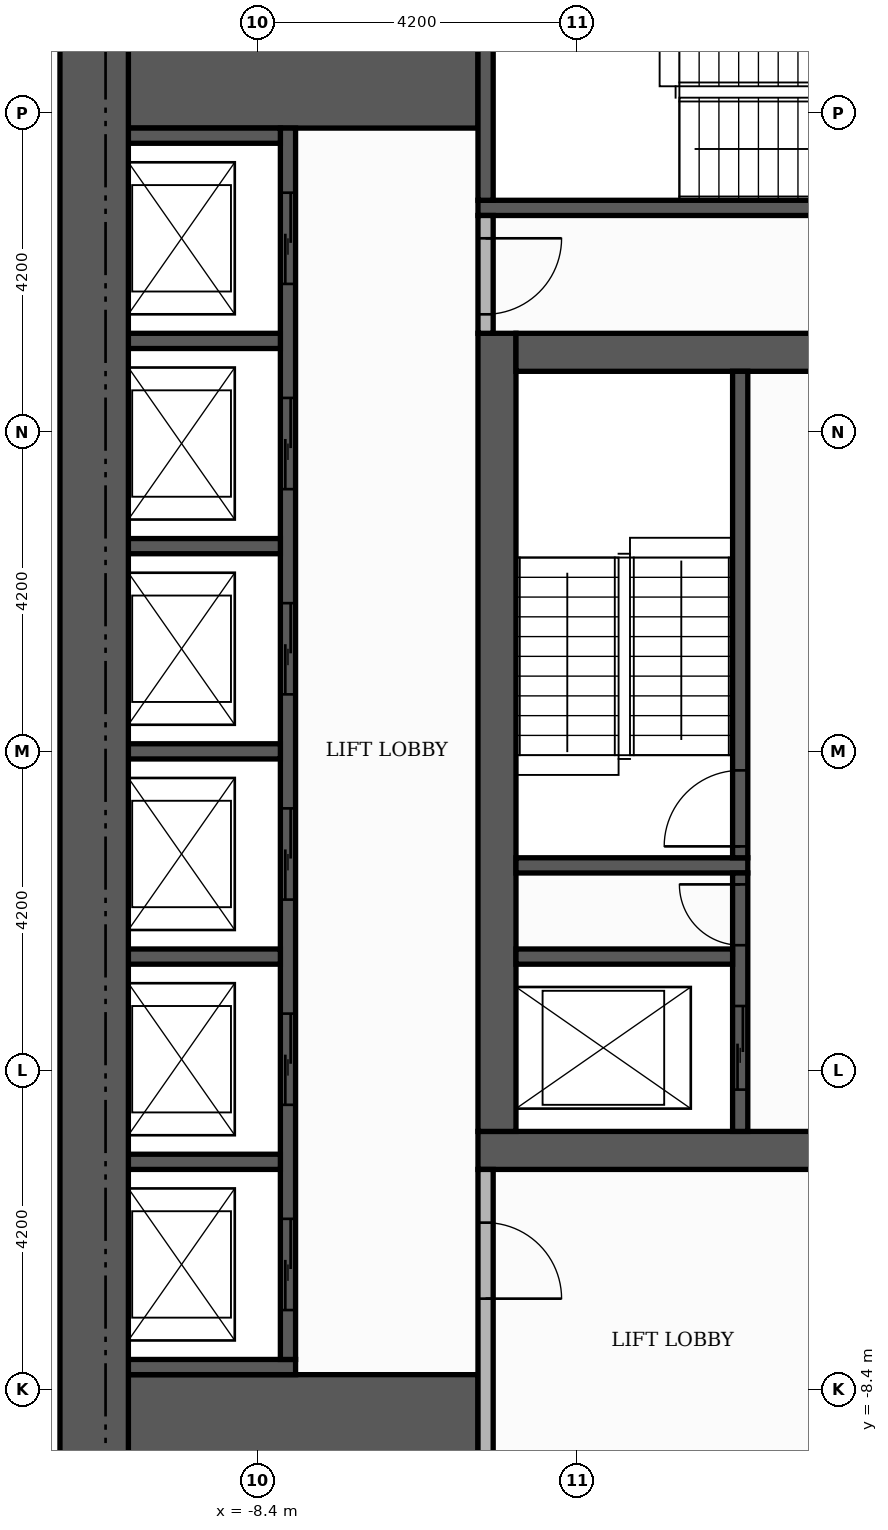
"""IFC4 building model, lengths in metres.
Left out: names, types, materials, properties, quantities, classifications, styles, units other than length and angle.
Written with IfcOpenShell. Run it as: python <this file> out.ifc"""

import sys

from ifc_helpers import new_model, si_unit, direction, frame, frame_2d, origin, place, context, subcontext, project, spatial, rectangle, extrude, element, fill, save


model = new_model("IFC4")
c1 = context("Model", 3, precision=1e-05, world=origin(), true_north=direction((0.0, 1.0)))
c2 = subcontext(c1, "Body", "Model", "MODEL_VIEW")
j1 = project(units=[si_unit("LENGTHUNIT", "METRE"), si_unit("PLANEANGLEUNIT", "RADIAN")], contexts=[c1])
p1 = place(None, origin())
s1 = spatial("IfcSite", under=j1, at=p1, CompositionType="ELEMENT")
p2 = place(p1, origin())
s2 = spatial("IfcBuilding", under=s1, at=p2, CompositionType="ELEMENT")
p3 = place(p2, frame((0.0, 0.0, 50.4)))
s3 = spatial("IfcBuildingStorey", under=s2, at=p3, CompositionType="ELEMENT", Elevation=50.4)
p4 = place(p3, frame((-5.5, -5.25, 0.0), z_axis=(0.0, 0.0, 1.0), x_axis=(1.0, 0.0, 0.0)))
e1 = element("IfcWall", 1, at=p4, inside=s3, PredefinedType="SHEAR", context=c2, shape_type="SweptSolid", body=[
    extrude(rectangle(XDim=11.0, YDim=0.5, at=frame_2d((5.5, 0.0))), origin(), (0.0, 0.0, 1.0), 3.48),
])
p5 = place(p4, frame((4.9, 0.0, 0.0)))
e2 = element("IfcOpeningElement", 2, at=p5, cuts=e1, PredefinedType="OPENING", context=c2, shape_type="SweptSolid", body=[
    extrude(rectangle(XDim=1.2, YDim=2.1, at=frame_2d((0.6, 1.05))), frame((0.0, 0.26, 0.0), z_axis=(0.0, -1.0, 0.0), x_axis=(1.0, 0.0, 0.0)), (0.0, 0.0, 1.0), 0.52),
])
p6 = place(p3, frame((-5.25, -5.0, 0.0), z_axis=(0.0, 0.0, 1.0), x_axis=(0.0, 1.0, 0.0)))
e3 = element("IfcWall", 3, at=p6, inside=s3, PredefinedType="SHEAR", context=c2, shape_type="SweptSolid", body=[
    extrude(rectangle(XDim=10.5, YDim=0.5, at=frame_2d((5.25, 0.0))), origin(), (0.0, 0.0, 1.0), 3.48),
])
p7 = place(p3, frame((-5.0, 5.25, 0.0), z_axis=(0.0, 0.0, 1.0), x_axis=(1.0, 0.0, 0.0)))
e4 = element("IfcWall", 4, at=p7, inside=s3, PredefinedType="SHEAR", context=c2, shape_type="SweptSolid", body=[
    extrude(rectangle(XDim=10.0, YDim=0.5, at=frame_2d((5.0, 0.0))), origin(), (0.0, 0.0, 1.0), 3.48),
])
p8 = place(p7, frame((4.4, 0.0, 0.0)))
e5 = element("IfcOpeningElement", 5, at=p8, cuts=e4, PredefinedType="OPENING", context=c2, shape_type="SweptSolid", body=[
    extrude(rectangle(XDim=1.2, YDim=2.1, at=frame_2d((0.6, 1.05))), frame((0.0, 0.26, 0.0), z_axis=(0.0, -1.0, 0.0), x_axis=(1.0, 0.0, 0.0)), (0.0, 0.0, 1.0), 0.52),
])
for number, where, z_axis, x_axis in (
    (6, (-10.1, -9.15, 0.0), (0.0, 0.0, 1.0), (1.0, 0.0, 0.0)),
    (7, (-10.1, 9.15, 0.0), (0.0, 0.0, 1.0), (1.0, 0.0, 0.0)),
):
    element("IfcWall", number, at=place(p3, frame(where, z_axis=z_axis, x_axis=x_axis)), inside=s3, PredefinedType="SHEAR", context=c2, shape_type="SweptSolid", body=[
        extrude(rectangle(XDim=4.6, YDim=1.9, at=frame_2d((2.3, 0.0))), origin(), (0.0, 0.0, 1.0), 3.48),
    ])
p9 = place(p3, frame((-5.0, -1.5, 0.0), z_axis=(0.0, 0.0, 1.0), x_axis=(1.0, 0.0, 0.0)))
e8 = element("IfcWall", 8, at=p9, inside=s3, PredefinedType="SHEAR", context=c2, shape_type="SweptSolid", body=[
    extrude(rectangle(XDim=3.05, YDim=0.2, at=frame_2d((1.525, 0.0))), origin(), (0.0, 0.0, 1.0), 3.48),
])
p10 = place(p3, frame((-2.05, -1.4, 0.0), z_axis=(0.0, 0.0, 1.0), x_axis=(0.0, 1.0, 0.0)))
e9 = element("IfcWall", 9, at=p10, inside=s3, PredefinedType="SHEAR", context=c2, shape_type="SweptSolid", body=[
    extrude(rectangle(XDim=6.4, YDim=0.2, at=frame_2d((3.2, 0.0))), origin(), (0.0, 0.0, 1.0), 3.48),
])
p11 = place(p10, frame((0.15, 0.0, 0.0)))
e10 = element("IfcOpeningElement", 10, at=p11, cuts=e9, PredefinedType="OPENING", context=c2, shape_type="SweptSolid", body=[
    extrude(rectangle(XDim=1.0, YDim=2.1, at=frame_2d((0.5, 1.05))), frame((0.0, 0.11, 0.0), z_axis=(0.0, -1.0, 0.0), x_axis=(1.0, 0.0, 0.0)), (0.0, 0.0, 1.0), 0.22),
])
p12 = place(p3, frame((-5.5, 7.15, 0.0), z_axis=(0.0, 0.0, 1.0), x_axis=(1.0, 0.0, 0.0)))
e11 = element("IfcWall", 11, at=p12, inside=s3, PredefinedType="SHEAR", context=c2, shape_type="SweptSolid", body=[
    extrude(rectangle(XDim=6.8, YDim=0.2, at=frame_2d((3.4, 0.0))), origin(), (0.0, 0.0, 1.0), 3.48),
])
p13 = place(p3, frame((-5.4, 7.25, 0.0), z_axis=(0.0, 0.0, 1.0), x_axis=(0.0, 1.0, 0.0)))
e12 = element("IfcWall", 12, at=p13, inside=s3, PredefinedType="SHEAR", context=c2, shape_type="SweptSolid", body=[
    extrude(rectangle(XDim=2.85, YDim=0.2, at=frame_2d((1.425, 0.0))), origin(), (0.0, 0.0, 1.0), 3.48),
])
p14 = place(p3, frame((-10.1, -8.1, 0.0), z_axis=(0.0, 0.0, 1.0), x_axis=(1.0, 0.0, 0.0)))
e13 = element("IfcWall", 13, at=p14, inside=s3, PredefinedType="SHEAR", context=c2, shape_type="SweptSolid", body=[
    extrude(rectangle(XDim=2.2, YDim=0.2, at=frame_2d((1.1, 0.0))), origin(), (0.0, 0.0, 1.0), 3.48),
])
p15 = place(p3, frame((-8.0, -8.0, 0.0), z_axis=(0.0, 0.0, 1.0), x_axis=(0.0, 1.0, 0.0)))
e14 = element("IfcWall", 14, at=p15, inside=s3, PredefinedType="SHEAR", context=c2, shape_type="SweptSolid", body=[
    extrude(rectangle(XDim=16.2, YDim=0.2, at=frame_2d((8.1, 0.0))), origin(), (0.0, 0.0, 1.0), 3.48),
])
p16 = place(p15, frame((0.65, 0.0, 0.0)))
e15 = element("IfcOpeningElement", 15, at=p16, cuts=e14, PredefinedType="OPENING", context=c2, shape_type="SweptSolid", body=[
    extrude(rectangle(XDim=1.2, YDim=2.1, at=frame_2d((0.6, 1.05))), frame((0.0, 0.11, 0.0), z_axis=(0.0, -1.0, 0.0), x_axis=(1.0, 0.0, 0.0)), (0.0, 0.0, 1.0), 0.22),
])
p17 = place(p15, frame((3.35, 0.0, 0.0)))
e16 = element("IfcOpeningElement", 16, at=p17, cuts=e14, PredefinedType="OPENING", context=c2, shape_type="SweptSolid", body=[
    extrude(rectangle(XDim=1.2, YDim=2.1, at=frame_2d((0.6, 1.05))), frame((0.0, 0.11, 0.0), z_axis=(0.0, -1.0, 0.0), x_axis=(1.0, 0.0, 0.0)), (0.0, 0.0, 1.0), 0.22),
])
p18 = place(p15, frame((6.05, 0.0, 0.0)))
e17 = element("IfcOpeningElement", 17, at=p18, cuts=e14, PredefinedType="OPENING", context=c2, shape_type="SweptSolid", body=[
    extrude(rectangle(XDim=1.2, YDim=2.1, at=frame_2d((0.6, 1.05))), frame((0.0, 0.11, 0.0), z_axis=(0.0, -1.0, 0.0), x_axis=(1.0, 0.0, 0.0)), (0.0, 0.0, 1.0), 0.22),
])
p19 = place(p15, frame((8.75, 0.0, 0.0)))
e18 = element("IfcOpeningElement", 18, at=p19, cuts=e14, PredefinedType="OPENING", context=c2, shape_type="SweptSolid", body=[
    extrude(rectangle(XDim=1.2, YDim=2.1, at=frame_2d((0.6, 1.05))), frame((0.0, 0.11, 0.0), z_axis=(0.0, -1.0, 0.0), x_axis=(1.0, 0.0, 0.0)), (0.0, 0.0, 1.0), 0.22),
])
p20 = place(p15, frame((11.45, 0.0, 0.0)))
e19 = element("IfcOpeningElement", 19, at=p20, cuts=e14, PredefinedType="OPENING", context=c2, shape_type="SweptSolid", body=[
    extrude(rectangle(XDim=1.2, YDim=2.1, at=frame_2d((0.6, 1.05))), frame((0.0, 0.11, 0.0), z_axis=(0.0, -1.0, 0.0), x_axis=(1.0, 0.0, 0.0)), (0.0, 0.0, 1.0), 0.22),
])
p21 = place(p15, frame((14.15, 0.0, 0.0)))
e20 = element("IfcOpeningElement", 20, at=p21, cuts=e14, PredefinedType="OPENING", context=c2, shape_type="SweptSolid", body=[
    extrude(rectangle(XDim=1.2, YDim=2.1, at=frame_2d((0.6, 1.05))), frame((0.0, 0.11, 0.0), z_axis=(0.0, -1.0, 0.0), x_axis=(1.0, 0.0, 0.0)), (0.0, 0.0, 1.0), 0.22),
])
p22 = place(p3, frame((-10.1, -5.4, 0.0), z_axis=(0.0, 0.0, 1.0), x_axis=(1.0, 0.0, 0.0)))
e21 = element("IfcWall", 21, at=p22, inside=s3, PredefinedType="SHEAR", context=c2, shape_type="SweptSolid", body=[
    extrude(rectangle(XDim=2.0, YDim=0.2, at=frame_2d((1.0, 0.0))), origin(), (0.0, 0.0, 1.0), 3.48),
])
p23 = place(p3, frame((-2.05, -5.0, 0.0), z_axis=(0.0, 0.0, 1.0), x_axis=(0.0, 1.0, 0.0)))
e22 = element("IfcWall", 22, at=p23, inside=s3, PredefinedType="SHEAR", context=c2, shape_type="SweptSolid", body=[
    extrude(rectangle(XDim=3.4, YDim=0.2, at=frame_2d((1.7, 0.0))), origin(), (0.0, 0.0, 1.0), 3.48),
])
p24 = place(p23, frame((0.55, 0.0, 0.0)))
e23 = element("IfcOpeningElement", 23, at=p24, cuts=e22, PredefinedType="OPENING", context=c2, shape_type="SweptSolid", body=[
    extrude(rectangle(XDim=1.1, YDim=2.1, at=frame_2d((0.55, 1.05))), frame((0.0, 0.11, 0.0), z_axis=(0.0, -1.0, 0.0), x_axis=(1.0, 0.0, 0.0)), (0.0, 0.0, 1.0), 0.22),
])
p25 = place(p23, frame((2.45, 0.0, 0.0)))
e24 = element("IfcOpeningElement", 24, at=p25, cuts=e22, PredefinedType="OPENING", context=c2, shape_type="SweptSolid", body=[
    extrude(rectangle(XDim=0.8, YDim=2.1, at=frame_2d((0.4, 1.05))), frame((0.0, 0.11, 0.0), z_axis=(0.0, -1.0, 0.0), x_axis=(1.0, 0.0, 0.0)), (0.0, 0.0, 1.0), 0.22),
])
p26 = place(p3, frame((-10.1, -2.7, 0.0), z_axis=(0.0, 0.0, 1.0), x_axis=(1.0, 0.0, 0.0)))
e25 = element("IfcWall", 25, at=p26, inside=s3, PredefinedType="SHEAR", context=c2, shape_type="SweptSolid", body=[
    extrude(rectangle(XDim=2.0, YDim=0.2, at=frame_2d((1.0, 0.0))), origin(), (0.0, 0.0, 1.0), 3.48),
])
p27 = place(p3, frame((-5.0, -2.7, 0.0), z_axis=(0.0, 0.0, 1.0), x_axis=(1.0, 0.0, 0.0)))
e26 = element("IfcWall", 26, at=p27, inside=s3, PredefinedType="SHEAR", context=c2, shape_type="SweptSolid", body=[
    extrude(rectangle(XDim=2.85, YDim=0.2, at=frame_2d((1.425, 0.0))), origin(), (0.0, 0.0, 1.0), 3.48),
])
for number, where, z_axis, x_axis in (
    (27, (-10.1, 0.0, 0.0), (0.0, 0.0, 1.0), (1.0, 0.0, 0.0)),
    (28, (-10.1, 2.7, 0.0), (0.0, 0.0, 1.0), (1.0, 0.0, 0.0)),
    (29, (-10.1, 5.4, 0.0), (0.0, 0.0, 1.0), (1.0, 0.0, 0.0)),
    (30, (-10.1, 8.1, 0.0), (0.0, 0.0, 1.0), (1.0, 0.0, 0.0)),
):
    element("IfcWall", number, at=place(p3, frame(where, z_axis=z_axis, x_axis=x_axis)), inside=s3, PredefinedType="SHEAR", context=c2, shape_type="SweptSolid", body=[
        extrude(rectangle(XDim=2.0, YDim=0.2, at=frame_2d((1.0, 0.0))), origin(), (0.0, 0.0, 1.0), 3.48),
    ])
p28 = place(p3, frame((-10.55, -10.1, 0.0), z_axis=(0.0, 0.0, 1.0), x_axis=(0.0, 1.0, 0.0)))
e31 = element("IfcWall", 31, at=p28, inside=s3, PredefinedType="SHEAR", context=c2, shape_type="SweptSolid", body=[
    extrude(rectangle(XDim=20.2, YDim=0.9, at=frame_2d((10.1, 0.0))), origin(), (0.0, 0.0, 1.0), 3.48),
])
p29 = place(p3, frame((-5.4, -10.1, 0.0), z_axis=(0.0, 0.0, 1.0), x_axis=(0.0, 1.0, 0.0)))
e32 = element("IfcWall", 32, at=p29, inside=s3, PredefinedType="PARTITIONING", context=c2, shape_type="SweptSolid", body=[
    extrude(rectangle(XDim=4.6, YDim=0.2, at=frame_2d((2.3, 0.0))), origin(), (0.0, 0.0, 1.0), 3.48),
])
p30 = place(p29, frame((2.9, 0.0, 0.0)))
e33 = element("IfcOpeningElement", 33, at=p30, cuts=e32, PredefinedType="OPENING", context=c2, shape_type="SweptSolid", body=[
    extrude(rectangle(XDim=1.0, YDim=2.1, at=frame_2d((0.5, 1.05))), frame((0.0, 0.11, 0.0), z_axis=(0.0, -1.0, 0.0), x_axis=(1.0, 0.0, 0.0)), (0.0, 0.0, 1.0), 0.22),
])
p31 = place(p3, frame((-5.4, 5.5, 0.0), z_axis=(0.0, 0.0, 1.0), x_axis=(0.0, 1.0, 0.0)))
e34 = element("IfcWall", 34, at=p31, inside=s3, PredefinedType="PARTITIONING", context=c2, shape_type="SweptSolid", body=[
    extrude(rectangle(XDim=1.55, YDim=0.2, at=frame_2d((0.775, 0.0))), origin(), (0.0, 0.0, 1.0), 3.48),
])
p32 = place(p31, frame((0.25, 0.0, 0.0)))
e35 = element("IfcOpeningElement", 35, at=p32, cuts=e34, PredefinedType="OPENING", context=c2, shape_type="SweptSolid", body=[
    extrude(rectangle(XDim=1.0, YDim=2.1, at=frame_2d((0.5, 1.05))), frame((0.0, 0.11, 0.0), z_axis=(0.0, -1.0, 0.0), x_axis=(1.0, 0.0, 0.0)), (0.0, 0.0, 1.0), 0.22),
])
p33 = place(p16, origin())
e36 = element("IfcDoor", 36, at=p33, inside=s3, OperationType="SLIDING_TO_LEFT", PredefinedType="DOOR", context=c2, shape_type="SweptSolid", body=[
    extrude(rectangle(XDim=1.2, YDim=2.1, at=frame_2d((0.6, 1.05))), frame((0.0, 0.025, 0.0), z_axis=(0.0, -1.0, 0.0), x_axis=(1.0, 0.0, 0.0)), (0.0, 0.0, 1.0), 0.05),
])
fill(e15, e36)
p34 = place(p17, origin())
e37 = element("IfcDoor", 37, at=p34, inside=s3, OperationType="SLIDING_TO_LEFT", PredefinedType="DOOR", context=c2, shape_type="SweptSolid", body=[
    extrude(rectangle(XDim=1.2, YDim=2.1, at=frame_2d((0.6, 1.05))), frame((0.0, 0.025, 0.0), z_axis=(0.0, -1.0, 0.0), x_axis=(1.0, 0.0, 0.0)), (0.0, 0.0, 1.0), 0.05),
])
fill(e16, e37)
p35 = place(p18, origin())
e38 = element("IfcDoor", 38, at=p35, inside=s3, OperationType="SLIDING_TO_LEFT", PredefinedType="DOOR", context=c2, shape_type="SweptSolid", body=[
    extrude(rectangle(XDim=1.2, YDim=2.1, at=frame_2d((0.6, 1.05))), frame((0.0, 0.025, 0.0), z_axis=(0.0, -1.0, 0.0), x_axis=(1.0, 0.0, 0.0)), (0.0, 0.0, 1.0), 0.05),
])
fill(e17, e38)
p36 = place(p19, origin())
e39 = element("IfcDoor", 39, at=p36, inside=s3, OperationType="SLIDING_TO_LEFT", PredefinedType="DOOR", context=c2, shape_type="SweptSolid", body=[
    extrude(rectangle(XDim=1.2, YDim=2.1, at=frame_2d((0.6, 1.05))), frame((0.0, 0.025, 0.0), z_axis=(0.0, -1.0, 0.0), x_axis=(1.0, 0.0, 0.0)), (0.0, 0.0, 1.0), 0.05),
])
fill(e18, e39)
p37 = place(p20, origin())
e40 = element("IfcDoor", 40, at=p37, inside=s3, OperationType="SLIDING_TO_LEFT", PredefinedType="DOOR", context=c2, shape_type="SweptSolid", body=[
    extrude(rectangle(XDim=1.2, YDim=2.1, at=frame_2d((0.6, 1.05))), frame((0.0, 0.025, 0.0), z_axis=(0.0, -1.0, 0.0), x_axis=(1.0, 0.0, 0.0)), (0.0, 0.0, 1.0), 0.05),
])
fill(e19, e40)
p38 = place(p21, origin())
e41 = element("IfcDoor", 41, at=p38, inside=s3, OperationType="SLIDING_TO_LEFT", PredefinedType="DOOR", context=c2, shape_type="SweptSolid", body=[
    extrude(rectangle(XDim=1.2, YDim=2.1, at=frame_2d((0.6, 1.05))), frame((0.0, 0.025, 0.0), z_axis=(0.0, -1.0, 0.0), x_axis=(1.0, 0.0, 0.0)), (0.0, 0.0, 1.0), 0.05),
])
fill(e20, e41)
p39 = place(p24, origin())
e42 = element("IfcDoor", 42, at=p39, inside=s3, OperationType="SLIDING_TO_LEFT", PredefinedType="DOOR", context=c2, shape_type="SweptSolid", body=[
    extrude(rectangle(XDim=1.1, YDim=2.1, at=frame_2d((0.55, 1.05))), frame((0.0, 0.025, 0.0), z_axis=(0.0, -1.0, 0.0), x_axis=(1.0, 0.0, 0.0)), (0.0, 0.0, 1.0), 0.05),
])
fill(e23, e42)
p40 = place(p11, origin())
e43 = element("IfcDoor", 43, at=p40, inside=s3, OperationType="SINGLE_SWING_LEFT", PredefinedType="DOOR", context=c2, shape_type="SweptSolid", body=[
    extrude(rectangle(XDim=1.0, YDim=2.1, at=frame_2d((0.5, 1.05))), frame((0.0, 0.025, 0.0), z_axis=(0.0, -1.0, 0.0), x_axis=(1.0, 0.0, 0.0)), (0.0, 0.0, 1.0), 0.05),
])
fill(e10, e43)
p41 = place(p25, origin())
e44 = element("IfcDoor", 44, at=p41, inside=s3, OperationType="SINGLE_SWING_RIGHT", PredefinedType="DOOR", context=c2, shape_type="SweptSolid", body=[
    extrude(rectangle(XDim=0.8, YDim=2.1, at=frame_2d((0.4, 1.05))), frame((0.0, 0.025, 0.0), z_axis=(0.0, -1.0, 0.0), x_axis=(1.0, 0.0, 0.0)), (0.0, 0.0, 1.0), 0.05),
])
fill(e24, e44)
p42 = place(p32, frame((1.0, 0.0, 0.0), z_axis=(0.0, 0.0, 1.0), x_axis=(-1.0, 0.0, 0.0)))
e45 = element("IfcDoor", 45, at=p42, inside=s3, OperationType="SINGLE_SWING_RIGHT", PredefinedType="DOOR", context=c2, shape_type="SweptSolid", body=[
    extrude(rectangle(XDim=1.0, YDim=2.1, at=frame_2d((0.5, 1.05))), frame((0.0, 0.025, 0.0), z_axis=(0.0, -1.0, 0.0), x_axis=(1.0, 0.0, 0.0)), (0.0, 0.0, 1.0), 0.05),
])
fill(e35, e45)
p43 = place(p30, frame((1.0, 0.0, 0.0), z_axis=(0.0, 0.0, 1.0), x_axis=(-1.0, 0.0, 0.0)))
e46 = element("IfcDoor", 46, at=p43, inside=s3, OperationType="SINGLE_SWING_LEFT", PredefinedType="DOOR", context=c2, shape_type="SweptSolid", body=[
    extrude(rectangle(XDim=1.0, YDim=2.1, at=frame_2d((0.5, 1.05))), frame((0.0, 0.025, 0.0), z_axis=(0.0, -1.0, 0.0), x_axis=(1.0, 0.0, 0.0)), (0.0, 0.0, 1.0), 0.05),
])
fill(e33, e46)
save(model, sys.argv[1])
